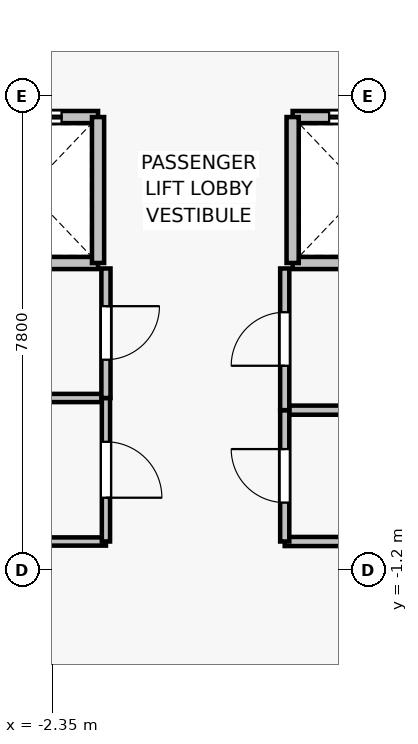
"""IFC4 building model, lengths in metres.
Left out: names, types, materials, properties, quantities, classifications, styles, units other than length and angle.
Written with IfcOpenShell. Run it as: python <this file> out.ifc"""

import sys

from ifc_helpers import new_model, si_unit, direction, frame, frame_2d, origin, place, context, subcontext, project, spatial, rectangle, extrude, source, transform, mapped, element, fill, save


model = new_model("IFC4")
c1 = context("Model", 3, precision=1e-05, world=origin(), true_north=direction((0.0, 1.0)))
c2 = subcontext(c1, "Body", "Model", "MODEL_VIEW")
j1 = project(units=[si_unit("LENGTHUNIT", "METRE"), si_unit("PLANEANGLEUNIT", "RADIAN")], contexts=[c1])
p1 = place(None, origin())
s1 = spatial("IfcSite", under=j1, at=p1, CompositionType="ELEMENT")
p2 = place(p1, origin())
s2 = spatial("IfcBuilding", under=s1, at=p2, CompositionType="ELEMENT")
p3 = place(p2, frame((0.0, 0.0, 192.4)))
s3 = spatial("IfcBuildingStorey", under=s2, at=p3, CompositionType="ELEMENT", Elevation=192.4)
p4 = place(p3, frame((-1.6, 3.85, 0.0), z_axis=(0.0, 0.0, 1.0), x_axis=(-1.0, 0.0, 0.0)))
e1 = element("IfcWall", 1, at=p4, inside=s3, PredefinedType="SOLIDWALL", context=c2, shape_type="SweptSolid", body=[
    extrude(rectangle(XDim=2.3, YDim=0.2, at=frame_2d((1.15, 0.0))), origin(), (0.0, 0.0, 1.0), 3.075),
])
p5 = place(p3, frame((-3.9, 6.25, 0.0), z_axis=(0.0, 0.0, 1.0), x_axis=(1.0, 0.0, 0.0)))
e2 = element("IfcWall", 2, at=p5, inside=s3, PredefinedType="SOLIDWALL", context=c2, shape_type="SweptSolid", body=[
    extrude(rectangle(XDim=2.3, YDim=0.2, at=frame_2d((1.15, 0.0))), origin(), (0.0, 0.0, 1.0), 3.075),
])
p6 = place(p5, frame((0.6, 0.0, 0.0)))
e3 = element("IfcOpeningElement", 3, at=p6, cuts=e2, PredefinedType="OPENING", context=c2, shape_type="SweptSolid", body=[
    extrude(rectangle(XDim=1.1, YDim=2.2, at=frame_2d((0.55, 1.1))), frame((0.0, 0.11, 0.0), z_axis=(0.0, -1.0, 0.0), x_axis=(1.0, 0.0, 0.0)), (0.0, 0.0, 1.0), 0.22),
])
p7 = place(p3, frame((-1.6, 6.25, 0.0), z_axis=(0.0, 0.0, 1.0), x_axis=(0.0, -1.0, 0.0)))
e4 = element("IfcWall", 4, at=p7, inside=s3, PredefinedType="SOLIDWALL", context=c2, shape_type="SweptSolid", body=[
    extrude(rectangle(XDim=2.4, YDim=0.2, at=frame_2d((1.2, 0.0))), origin(), (0.0, 0.0, 1.0), 3.075),
])
p8 = place(p3, frame((3.9, 3.85, 0.0), z_axis=(0.0, 0.0, 1.0), x_axis=(-1.0, 0.0, 0.0)))
e5 = element("IfcWall", 5, at=p8, inside=s3, PredefinedType="SOLIDWALL", context=c2, shape_type="SweptSolid", body=[
    extrude(rectangle(XDim=2.3, YDim=0.2, at=frame_2d((1.15, 0.0))), origin(), (0.0, 0.0, 1.0), 3.075),
])
p9 = place(p3, frame((1.6, 6.25, 0.0), z_axis=(0.0, 0.0, 1.0), x_axis=(1.0, 0.0, 0.0)))
e6 = element("IfcWall", 6, at=p9, inside=s3, PredefinedType="SOLIDWALL", context=c2, shape_type="SweptSolid", body=[
    extrude(rectangle(XDim=2.3, YDim=0.2, at=frame_2d((1.15, 0.0))), origin(), (0.0, 0.0, 1.0), 3.075),
])
p10 = place(p9, frame((0.6, 0.0, 0.0)))
e7 = element("IfcOpeningElement", 7, at=p10, cuts=e6, PredefinedType="OPENING", context=c2, shape_type="SweptSolid", body=[
    extrude(rectangle(XDim=1.1, YDim=2.2, at=frame_2d((0.55, 1.1))), frame((0.0, 0.11, 0.0), z_axis=(0.0, -1.0, 0.0), x_axis=(1.0, 0.0, 0.0)), (0.0, 0.0, 1.0), 0.22),
])
p11 = place(p3, frame((1.6, 3.85, 0.0), z_axis=(0.0, 0.0, 1.0), x_axis=(0.0, 1.0, 0.0)))
e8 = element("IfcWall", 8, at=p11, inside=s3, PredefinedType="SOLIDWALL", context=c2, shape_type="SweptSolid", body=[
    extrude(rectangle(XDim=2.4, YDim=0.2, at=frame_2d((1.2, 0.0))), origin(), (0.0, 0.0, 1.0), 3.075),
])
for number, where, z_axis, x_axis in (
    (9, (-1.47, -0.73, 0.0), (0.0, 0.0, 1.0), (-1.0, 0.0, 0.0)),
    (10, (-3.47, 1.63, 0.0), (0.0, 0.0, 1.0), (1.0, 0.0, 0.0)),
):
    element("IfcWall", number, at=place(p3, frame(where, z_axis=z_axis, x_axis=x_axis)), inside=s3, PredefinedType="PARTITIONING", context=c2, shape_type="SweptSolid", body=[
        extrude(rectangle(XDim=2.0, YDim=0.135, at=frame_2d((1.0, 0.0))), origin(), (0.0, 0.0, 1.0), 3.075),
    ])
p12 = place(p3, frame((-1.47, 1.63, 0.0), z_axis=(0.0, 0.0, 1.0), x_axis=(0.0, -1.0, 0.0)))
e11 = element("IfcWall", 11, at=p12, inside=s3, PredefinedType="PARTITIONING", context=c2, shape_type="SweptSolid", body=[
    extrude(rectangle(XDim=2.36, YDim=0.135, at=frame_2d((1.18, 0.0))), origin(), (0.0, 0.0, 1.0), 3.075),
])
p13 = place(p12, frame((0.72, 0.0, 0.0)))
e12 = element("IfcOpeningElement", 12, at=p13, cuts=e11, PredefinedType="OPENING", context=c2, shape_type="SweptSolid", body=[
    extrude(rectangle(XDim=0.92, YDim=2.1, at=frame_2d((0.46, 1.05))), frame((0.0, 0.077, 0.0), z_axis=(0.0, -1.0, 0.0), x_axis=(1.0, 0.0, 0.0)), (0.0, 0.0, 1.0), 0.155),
])
p14 = place(p3, frame((-1.47, 3.76, 0.0), z_axis=(0.0, 0.0, 1.0), x_axis=(0.0, -1.0, 0.0)))
e13 = element("IfcWall", 13, at=p14, inside=s3, PredefinedType="PARTITIONING", context=c2, shape_type="SweptSolid", body=[
    extrude(rectangle(XDim=2.13, YDim=0.15, at=frame_2d((1.065, 0.0))), origin(), (0.0, 0.0, 1.0), 3.075),
])
p15 = place(p14, frame((0.62, 0.0, 0.0)))
e14 = element("IfcOpeningElement", 14, at=p15, cuts=e13, PredefinedType="OPENING", context=c2, shape_type="SweptSolid", body=[
    extrude(rectangle(XDim=0.88, YDim=2.1, at=frame_2d((0.44, 1.05))), frame((0.0, 0.085, 0.0), z_axis=(0.0, -1.0, 0.0), x_axis=(1.0, 0.0, 0.0)), (0.0, 0.0, 1.0), 0.17),
])
for number, where, z_axis, x_axis in (
    (15, (3.68, -0.73, 0.0), (0.0, 0.0, 1.0), (-1.0, 0.0, 0.0)),
    (16, (1.47, 1.43, 0.0), (0.0, 0.0, 1.0), (1.0, 0.0, 0.0)),
):
    element("IfcWall", number, at=place(p3, frame(where, z_axis=z_axis, x_axis=x_axis)), inside=s3, PredefinedType="PARTITIONING", context=c2, shape_type="SweptSolid", body=[
        extrude(rectangle(XDim=2.21, YDim=0.15, at=frame_2d((1.105, 0.0))), origin(), (0.0, 0.0, 1.0), 3.075),
    ])
p16 = place(p3, frame((1.47, -0.73, 0.0), z_axis=(0.0, 0.0, 1.0), x_axis=(0.0, 1.0, 0.0)))
e17 = element("IfcWall", 17, at=p16, inside=s3, PredefinedType="PARTITIONING", context=c2, shape_type="SweptSolid", body=[
    extrude(rectangle(XDim=2.16, YDim=0.15, at=frame_2d((1.08, 0.0))), origin(), (0.0, 0.0, 1.0), 3.075),
])
p17 = place(p16, frame((0.64, 0.0, 0.0)))
e18 = element("IfcOpeningElement", 18, at=p17, cuts=e17, PredefinedType="OPENING", context=c2, shape_type="SweptSolid", body=[
    extrude(rectangle(XDim=0.88, YDim=2.1, at=frame_2d((0.44, 1.05))), frame((0.0, 0.085, 0.0), z_axis=(0.0, -1.0, 0.0), x_axis=(1.0, 0.0, 0.0)), (0.0, 0.0, 1.0), 0.17),
])
p18 = place(p3, frame((1.47, 1.43, 0.0), z_axis=(0.0, 0.0, 1.0), x_axis=(0.0, 1.0, 0.0)))
e19 = element("IfcWall", 19, at=p18, inside=s3, PredefinedType="PARTITIONING", context=c2, shape_type="SweptSolid", body=[
    extrude(rectangle(XDim=2.33, YDim=0.15, at=frame_2d((1.165, 0.0))), origin(), (0.0, 0.0, 1.0), 3.075),
])
p19 = place(p18, frame((0.73, 0.0, 0.0)))
e20 = element("IfcOpeningElement", 20, at=p19, cuts=e19, PredefinedType="OPENING", context=c2, shape_type="SweptSolid", body=[
    extrude(rectangle(XDim=0.88, YDim=2.15, at=frame_2d((0.44, 1.075))), frame((0.0, 0.085, 0.0), z_axis=(0.0, -1.0, 0.0), x_axis=(1.0, 0.0, 0.0)), (0.0, 0.0, 1.0), 0.17),
])
m1 = source(origin(), c2, "Body", "SweptSolid", [
    extrude(rectangle(XDim=1.1, YDim=2.2, at=frame_2d((0.55, 1.1))), frame((0.0, 0.025, 0.0), z_axis=(0.0, -1.0, 0.0), x_axis=(1.0, 0.0, 0.0)), (0.0, 0.0, 1.0), 0.05),
])
p20 = place(p6, origin())
e21 = element("IfcDoor", 21, at=p20, inside=s3, OperationType="DOUBLE_DOOR_SLIDING", PredefinedType="DOOR", context=c2, shape_type="MappedRepresentation", body=[
    mapped(m1, transform((0.0, 0.0, 0.0), x_axis=(1.0, 0.0, 0.0), y_axis=(0.0, 1.0, 0.0), z_axis=(0.0, 0.0, 1.0), scale=1.0)),
])
fill(e3, e21)
p21 = place(p10, origin())
e22 = element("IfcDoor", 22, at=p21, inside=s3, OperationType="DOUBLE_DOOR_SLIDING", PredefinedType="DOOR", context=c2, shape_type="MappedRepresentation", body=[
    mapped(m1, transform((0.0, 0.0, 0.0), x_axis=(1.0, 0.0, 0.0), y_axis=(0.0, 1.0, 0.0), z_axis=(0.0, 0.0, 1.0), scale=1.0)),
])
fill(e7, e22)
m2 = source(origin(), c2, "Body", "SweptSolid", [
    extrude(rectangle(XDim=0.92, YDim=2.1, at=frame_2d((0.46, 1.05))), frame((0.0, 0.025, 0.0), z_axis=(0.0, -1.0, 0.0), x_axis=(1.0, 0.0, 0.0)), (0.0, 0.0, 1.0), 0.05),
])
p22 = place(p13, origin())
e23 = element("IfcDoor", 23, at=p22, inside=s3, OperationType="SINGLE_SWING_RIGHT", PredefinedType="DOOR", context=c2, shape_type="MappedRepresentation", body=[
    mapped(m2, transform((0.0, 0.0, 0.0), x_axis=(1.0, 0.0, 0.0), y_axis=(0.0, 1.0, 0.0), z_axis=(0.0, 0.0, 1.0), scale=1.0)),
])
fill(e12, e23)
m3 = source(origin(), c2, "Body", "SweptSolid", [
    extrude(rectangle(XDim=0.88, YDim=2.1, at=frame_2d((0.44, 1.05))), frame((0.0, 0.025, 0.0), z_axis=(0.0, -1.0, 0.0), x_axis=(1.0, 0.0, 0.0)), (0.0, 0.0, 1.0), 0.05),
])
p23 = place(p15, origin())
e24 = element("IfcDoor", 24, at=p23, inside=s3, OperationType="SINGLE_SWING_LEFT", PredefinedType="DOOR", context=c2, shape_type="MappedRepresentation", body=[
    mapped(m3, transform((0.0, 0.0, 0.0), x_axis=(1.0, 0.0, 0.0), y_axis=(0.0, 1.0, 0.0), z_axis=(0.0, 0.0, 1.0), scale=1.0)),
])
fill(e14, e24)
p24 = place(p17, origin())
e25 = element("IfcDoor", 25, at=p24, inside=s3, OperationType="SINGLE_SWING_RIGHT", PredefinedType="DOOR", context=c2, shape_type="MappedRepresentation", body=[
    mapped(m3, transform((0.0, 0.0, 0.0), x_axis=(1.0, 0.0, 0.0), y_axis=(0.0, 1.0, 0.0), z_axis=(0.0, 0.0, 1.0), scale=1.0)),
])
fill(e18, e25)
m4 = source(origin(), c2, "Body", "SweptSolid", [
    extrude(rectangle(XDim=0.88, YDim=2.15, at=frame_2d((0.44, 1.075))), frame((0.0, 0.025, 0.0), z_axis=(0.0, -1.0, 0.0), x_axis=(1.0, 0.0, 0.0)), (0.0, 0.0, 1.0), 0.05),
])
p25 = place(p19, origin())
e26 = element("IfcDoor", 26, at=p25, inside=s3, OperationType="SINGLE_SWING_LEFT", PredefinedType="DOOR", context=c2, shape_type="MappedRepresentation", body=[
    mapped(m4, transform((0.0, 0.0, 0.0), x_axis=(1.0, 0.0, 0.0), y_axis=(0.0, 1.0, 0.0), z_axis=(0.0, 0.0, 1.0), scale=1.0)),
])
fill(e20, e26)
save(model, sys.argv[1])
